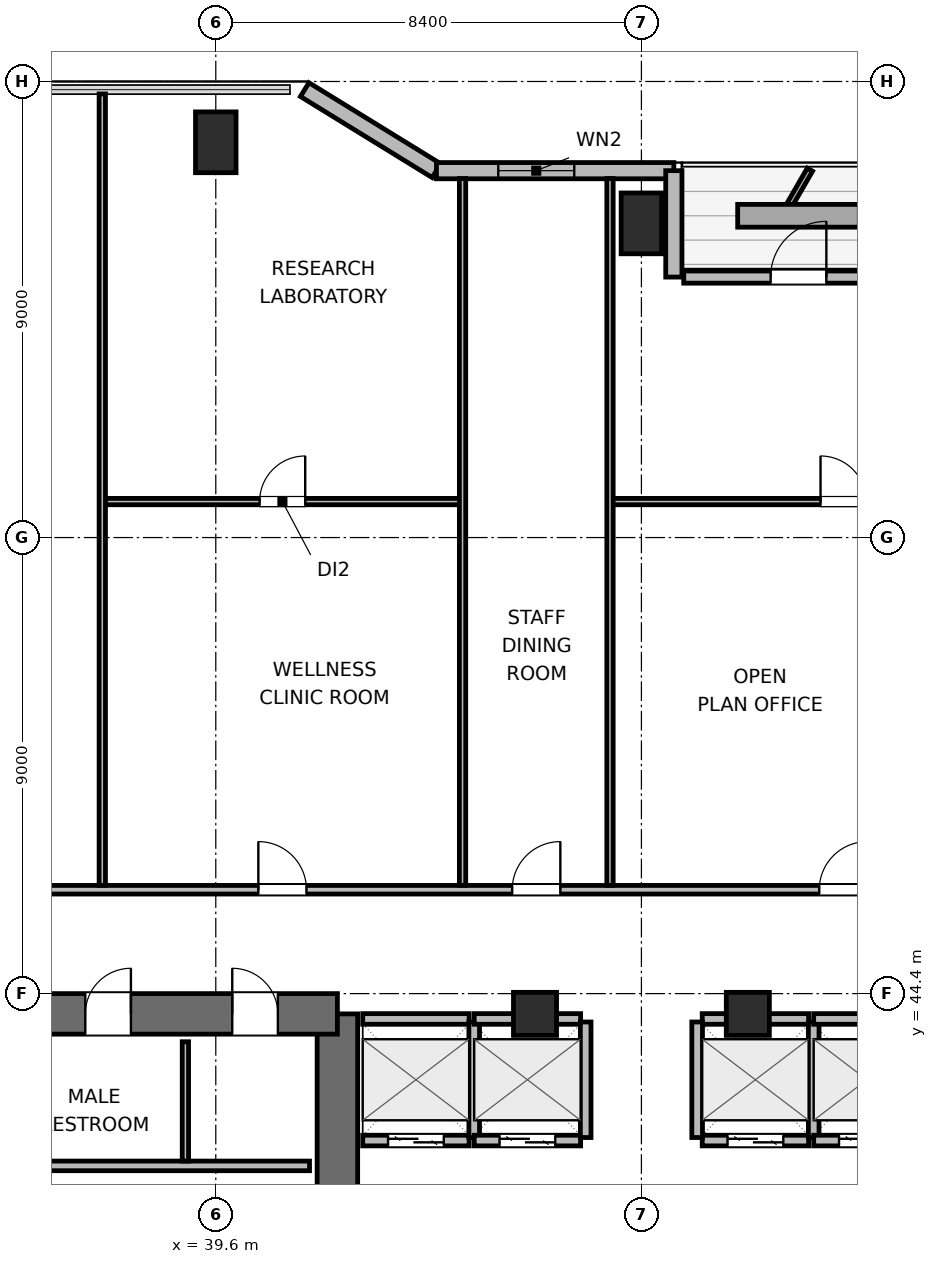
"""IFC4 building model, lengths in metres.
Left out: names, types, materials, properties, quantities, classifications, styles, units other than length and angle.
Written with IfcOpenShell. Run it as: python <this file> out.ifc"""

import sys

from ifc_helpers import new_model, si_unit, direction, frame, frame_2d, origin, origin_2d, place, context, subcontext, project, spatial, rectangle, extrude, element, fill, save


model = new_model("IFC4")
c1 = context("Model", 3, precision=1e-05, world=origin(), true_north=direction((0.0, 1.0)))
c2 = subcontext(c1, "Body", "Model", "MODEL_VIEW")
j1 = project(units=[si_unit("LENGTHUNIT", "METRE"), si_unit("PLANEANGLEUNIT", "RADIAN")], contexts=[c1])
p1 = place(None, origin())
s1 = spatial("IfcSite", under=j1, at=p1, CompositionType="ELEMENT")
p2 = place(p1, origin())
s2 = spatial("IfcBuilding", under=s1, at=p2, CompositionType="ELEMENT")
p3 = place(p2, frame((0.0, 0.0, 133.8)))
s3 = spatial("IfcBuildingStorey", under=s2, at=p3, CompositionType="ELEMENT", Elevation=133.8)
p4 = place(p3, frame((42.0, 37.8, 0.0), z_axis=(0.0, 0.0, 1.0), x_axis=(0.0, 1.0, 0.0)))
e1 = element("IfcWall", 1, at=p4, inside=s3, PredefinedType="SHEAR", context=c2, shape_type="SweptSolid", body=[
    extrude(rectangle(XDim=6.2, YDim=0.8, at=frame_2d((3.1, 0.0))), origin(), (0.0, 0.0, 1.0), 3.9),
])
p5 = place(p3, frame((32.8, 44.0, 0.0), z_axis=(0.0, 0.0, 1.0), x_axis=(1.0, 0.0, 0.0)))
e2 = element("IfcWall", 2, at=p5, inside=s3, PredefinedType="SHEAR", context=c2, shape_type="SweptSolid", body=[
    extrude(rectangle(XDim=9.2, YDim=0.8, at=frame_2d((4.6, 0.0))), origin(), (0.0, 0.0, 1.0), 3.9),
])
p6 = place(p5, frame((0.975, 0.0, 0.0)))
e3 = element("IfcOpeningElement", 3, at=p6, cuts=e2, PredefinedType="OPENING", context=c2, shape_type="SweptSolid", body=[
    extrude(rectangle(XDim=0.95, YDim=2.04, at=frame_2d((0.475, 1.02))), frame((0.0, 0.41, 0.0), z_axis=(0.0, -1.0, 0.0), x_axis=(1.0, 0.0, 0.0)), (0.0, 0.0, 1.0), 0.82),
])
p7 = place(p5, frame((4.225, 0.0, 0.0)))
e4 = element("IfcOpeningElement", 4, at=p7, cuts=e2, PredefinedType="OPENING", context=c2, shape_type="SweptSolid", body=[
    extrude(rectangle(XDim=0.9, YDim=2.02, at=frame_2d((0.45, 1.01))), frame((0.0, 0.41, 0.0), z_axis=(0.0, -1.0, 0.0), x_axis=(1.0, 0.0, 0.0)), (0.0, 0.0, 1.0), 0.82),
])
p8 = place(p5, frame((7.125, 0.0, 0.0)))
e5 = element("IfcOpeningElement", 5, at=p8, cuts=e2, PredefinedType="OPENING", context=c2, shape_type="SweptSolid", body=[
    extrude(rectangle(XDim=0.9, YDim=2.02, at=frame_2d((0.45, 1.01))), frame((0.0, 0.41, 0.0), z_axis=(0.0, -1.0, 0.0), x_axis=(1.0, 0.0, 0.0)), (0.0, 0.0, 1.0), 0.82),
])
for number, where, z_axis, x_axis in (
    (6, (39.6, 61.2, 0.0), (0.0, 0.0, 1.0), (1.0, 0.0, 0.0)),
    (7, (48.0, 59.6, 0.0), (0.0, 0.0, 1.0), (1.0, 0.0, 0.0)),
):
    element("IfcColumn", number, at=place(p3, frame(where, z_axis=z_axis, x_axis=x_axis)), inside=s3, PredefinedType="COLUMN", context=c2, shape_type="SweptSolid", body=[
        extrude(rectangle(XDim=0.8, YDim=1.2, at=origin_2d()), origin(), (0.0, 0.0, 1.0), 3.9),
    ])
for number, where, z_axis, x_axis in (
    (8, (45.9, 44.0, 0.0), (0.0, 0.0, 1.0), (1.0, 0.0, 0.0)),
    (9, (50.1, 44.0, 0.0), (0.0, 0.0, 1.0), (1.0, 0.0, 0.0)),
):
    element("IfcColumn", number, at=place(p3, frame(where, z_axis=z_axis, x_axis=x_axis)), inside=s3, PredefinedType="COLUMN", context=c2, shape_type="SweptSolid", body=[
        extrude(rectangle(XDim=0.85, YDim=0.85, at=origin_2d()), origin(), (0.0, 0.0, 1.0), 3.9),
    ])
p9 = place(p3, frame((41.355, 62.24, 0.0), z_axis=(0.0, 0.0, 1.0), x_axis=(0.851630857047, -0.524142044989, 0.0)))
e10 = element("IfcWall", 10, at=p9, inside=s3, PredefinedType="SOLIDWALL", context=c2, shape_type="SweptSolid", body=[
    extrude(rectangle(XDim=3.053, YDim=0.32, at=frame_2d((1.526, 0.0))), origin(), (0.0, 0.0, 1.0), 2.875),
])
p10 = place(p3, frame((43.955, 60.64, 0.0), z_axis=(0.0, 0.0, 1.0), x_axis=(1.0, 0.0, 0.0)))
e11 = element("IfcWall", 11, at=p10, inside=s3, PredefinedType="SOLIDWALL", context=c2, shape_type="SweptSolid", body=[
    extrude(rectangle(XDim=4.685, YDim=0.32, at=frame_2d((2.343, 0.0))), origin(), (0.0, 0.0, 1.0), 2.875),
])
p11 = place(p10, frame((1.22, 0.0, 0.85)))
e12 = element("IfcOpeningElement", 12, at=p11, cuts=e11, PredefinedType="OPENING", context=c2, shape_type="SweptSolid", body=[
    extrude(rectangle(XDim=1.5, YDim=1.1, at=frame_2d((0.75, 0.55))), frame((0.0, 0.17, 0.0), z_axis=(0.0, -1.0, 0.0), x_axis=(1.0, 0.0, 0.0)), (0.0, 0.0, 1.0), 0.34),
])
p12 = place(p3, frame((48.64, 60.64, 0.0), z_axis=(0.0, 0.0, 1.0), x_axis=(0.0, -1.0, 0.0)))
e13 = element("IfcWall", 13, at=p12, inside=s3, PredefinedType="SOLIDWALL", context=c2, shape_type="SweptSolid", body=[
    extrude(rectangle(XDim=2.1, YDim=0.32, at=frame_2d((1.05, 0.0))), origin(), (0.0, 0.0, 1.0), 2.875),
])
p13 = place(p3, frame((48.835, 58.54, 0.0), z_axis=(0.0, 0.0, 1.0), x_axis=(1.0, 0.0, 0.0)))
e14 = element("IfcWall", 14, at=p13, inside=s3, PredefinedType="SOLIDWALL", context=c2, shape_type="SweptSolid", body=[
    extrude(rectangle(XDim=4.53, YDim=0.24, at=frame_2d((2.265, 0.0))), origin(), (0.0, 0.0, 1.0), 3.64),
])
p14 = place(p13, frame((1.715, 0.0, 0.0)))
e15 = element("IfcOpeningElement", 15, at=p14, cuts=e14, PredefinedType="OPENING", context=c2, shape_type="SweptSolid", body=[
    extrude(rectangle(XDim=1.1, YDim=2.04, at=frame_2d((0.55, 1.02))), frame((0.0, 0.13, 0.0), z_axis=(0.0, -1.0, 0.0), x_axis=(1.0, 0.0, 0.0)), (0.0, 0.0, 1.0), 0.26),
])
p15 = place(p3, frame((33.35, 41.0, 0.0), z_axis=(0.0, 0.0, 1.0), x_axis=(1.0, 0.0, 0.0)))
e16 = element("IfcWall", 16, at=p15, inside=s3, PredefinedType="PLUMBINGWALL", context=c2, shape_type="SweptSolid", body=[
    extrude(rectangle(XDim=8.1, YDim=0.19, at=frame_2d((4.05, 0.0))), origin(), (0.0, 0.0, 1.0), 3.64),
])
p16 = place(p3, frame((39.0, 41.095, 0.0), z_axis=(0.0, 0.0, 1.0), x_axis=(0.0, 1.0, 0.0)))
e17 = element("IfcWall", 17, at=p16, inside=s3, PredefinedType="PARTITIONING", context=c2, shape_type="SweptSolid", body=[
    extrude(rectangle(XDim=2.355, YDim=0.125, at=frame_2d((1.177, 0.0))), origin(), (0.0, 0.0, 1.0), 3.64),
])
p17 = place(p3, frame((42.5, 41.5, 0.0), z_axis=(0.0, 0.0, 1.0), x_axis=(1.0, 0.0, 0.0)))
e18 = element("IfcWall", 18, at=p17, inside=s3, PredefinedType="PARTITIONING", context=c2, shape_type="SweptSolid", body=[
    extrude(rectangle(XDim=2.1, YDim=0.21, at=frame_2d((1.05, 0.0))), origin(), (0.0, 0.0, 1.0), 3.64),
])
p18 = place(p17, frame((0.5, 0.0, 0.0)))
e19 = element("IfcOpeningElement", 19, at=p18, cuts=e18, PredefinedType="OPENING", context=c2, shape_type="SweptSolid", body=[
    extrude(rectangle(XDim=1.1, YDim=2.04, at=frame_2d((0.55, 1.02))), frame((0.0, 0.115, 0.0), z_axis=(0.0, -1.0, 0.0), x_axis=(1.0, 0.0, 0.0)), (0.0, 0.0, 1.0), 0.23),
])
p19 = place(p3, frame((42.5, 43.9, 0.0), z_axis=(0.0, 0.0, 1.0), x_axis=(1.0, 0.0, 0.0)))
e20 = element("IfcWall", 20, at=p19, inside=s3, PredefinedType="PARTITIONING", context=c2, shape_type="SweptSolid", body=[
    extrude(rectangle(XDim=2.1, YDim=0.21, at=frame_2d((1.05, 0.0))), origin(), (0.0, 0.0, 1.0), 2.525),
])
p20 = place(p3, frame((44.7, 41.56, 0.0), z_axis=(0.0, 0.0, 1.0), x_axis=(0.0, 1.0, 0.0)))
e21 = element("IfcWall", 21, at=p20, inside=s3, PredefinedType="PARTITIONING", context=c2, shape_type="SweptSolid", body=[
    extrude(rectangle(XDim=2.28, YDim=0.21, at=frame_2d((1.14, 0.0))), origin(), (0.0, 0.0, 1.0), 3.64),
])
p21 = place(p3, frame((44.7, 41.5, 0.0), z_axis=(0.0, 0.0, 1.0), x_axis=(1.0, 0.0, 0.0)))
e22 = element("IfcWall", 22, at=p21, inside=s3, PredefinedType="PARTITIONING", context=c2, shape_type="SweptSolid", body=[
    extrude(rectangle(XDim=2.1, YDim=0.21, at=frame_2d((1.05, 0.0))), origin(), (0.0, 0.0, 1.0), 3.64),
])
p22 = place(p21, frame((0.5, 0.0, 0.0)))
e23 = element("IfcOpeningElement", 23, at=p22, cuts=e22, PredefinedType="OPENING", context=c2, shape_type="SweptSolid", body=[
    extrude(rectangle(XDim=1.1, YDim=2.04, at=frame_2d((0.55, 1.02))), frame((0.0, 0.115, 0.0), z_axis=(0.0, -1.0, 0.0), x_axis=(1.0, 0.0, 0.0)), (0.0, 0.0, 1.0), 0.23),
])
p23 = place(p3, frame((44.7, 43.9, 0.0), z_axis=(0.0, 0.0, 1.0), x_axis=(1.0, 0.0, 0.0)))
e24 = element("IfcWall", 24, at=p23, inside=s3, PredefinedType="PARTITIONING", context=c2, shape_type="SweptSolid", body=[
    extrude(rectangle(XDim=2.1, YDim=0.21, at=frame_2d((1.05, 0.0))), origin(), (0.0, 0.0, 1.0), 2.525),
])
p24 = place(p3, frame((46.9, 41.56, 0.0), z_axis=(0.0, 0.0, 1.0), x_axis=(0.0, 1.0, 0.0)))
e25 = element("IfcWall", 25, at=p24, inside=s3, PredefinedType="PARTITIONING", context=c2, shape_type="SweptSolid", body=[
    extrude(rectangle(XDim=2.28, YDim=0.21, at=frame_2d((1.14, 0.0))), origin(), (0.0, 0.0, 1.0), 3.64),
])
p25 = place(p3, frame((49.2, 41.5, 0.0), z_axis=(0.0, 0.0, 1.0), x_axis=(1.0, 0.0, 0.0)))
e26 = element("IfcWall", 26, at=p25, inside=s3, PredefinedType="PARTITIONING", context=c2, shape_type="SweptSolid", body=[
    extrude(rectangle(XDim=2.1, YDim=0.21, at=frame_2d((1.05, 0.0))), origin(), (0.0, 0.0, 1.0), 3.64),
])
p26 = place(p25, frame((0.5, 0.0, 0.0)))
e27 = element("IfcOpeningElement", 27, at=p26, cuts=e26, PredefinedType="OPENING", context=c2, shape_type="SweptSolid", body=[
    extrude(rectangle(XDim=1.1, YDim=2.04, at=frame_2d((0.55, 1.02))), frame((0.0, 0.115, 0.0), z_axis=(0.0, -1.0, 0.0), x_axis=(1.0, 0.0, 0.0)), (0.0, 0.0, 1.0), 0.23),
])
p27 = place(p3, frame((49.2, 43.9, 0.0), z_axis=(0.0, 0.0, 1.0), x_axis=(1.0, 0.0, 0.0)))
e28 = element("IfcWall", 28, at=p27, inside=s3, PredefinedType="PARTITIONING", context=c2, shape_type="SweptSolid", body=[
    extrude(rectangle(XDim=2.1, YDim=0.21, at=frame_2d((1.05, 0.0))), origin(), (0.0, 0.0, 1.0), 2.525),
])
for number, where, z_axis, x_axis in (
    (29, (49.1, 41.56, 0.0), (0.0, 0.0, 1.0), (0.0, 1.0, 0.0)),
    (30, (51.4, 41.56, 0.0), (0.0, 0.0, 1.0), (0.0, 1.0, 0.0)),
):
    element("IfcWall", number, at=place(p3, frame(where, z_axis=z_axis, x_axis=x_axis)), inside=s3, PredefinedType="PARTITIONING", context=c2, shape_type="SweptSolid", body=[
        extrude(rectangle(XDim=2.28, YDim=0.21, at=frame_2d((1.14, 0.0))), origin(), (0.0, 0.0, 1.0), 3.64),
    ])
p28 = place(p3, frame((51.4, 41.5, 0.0), z_axis=(0.0, 0.0, 1.0), x_axis=(1.0, 0.0, 0.0)))
e31 = element("IfcWall", 31, at=p28, inside=s3, PredefinedType="PARTITIONING", context=c2, shape_type="SweptSolid", body=[
    extrude(rectangle(XDim=2.1, YDim=0.21, at=frame_2d((1.05, 0.0))), origin(), (0.0, 0.0, 1.0), 3.64),
])
p29 = place(p28, frame((0.5, 0.0, 0.0)))
e32 = element("IfcOpeningElement", 32, at=p29, cuts=e31, PredefinedType="OPENING", context=c2, shape_type="SweptSolid", body=[
    extrude(rectangle(XDim=1.1, YDim=2.04, at=frame_2d((0.55, 1.02))), frame((0.0, 0.115, 0.0), z_axis=(0.0, -1.0, 0.0), x_axis=(1.0, 0.0, 0.0)), (0.0, 0.0, 1.0), 0.23),
])
p30 = place(p3, frame((51.4, 43.9, 0.0), z_axis=(0.0, 0.0, 1.0), x_axis=(1.0, 0.0, 0.0)))
e33 = element("IfcWall", 33, at=p30, inside=s3, PredefinedType="PARTITIONING", context=c2, shape_type="SweptSolid", body=[
    extrude(rectangle(XDim=2.1, YDim=0.21, at=frame_2d((1.05, 0.0))), origin(), (0.0, 0.0, 1.0), 2.525),
])
p31 = place(p3, frame((30.35, 46.45, 0.0), z_axis=(0.0, 0.0, 1.0), x_axis=(1.0, 0.0, 0.0)))
e34 = element("IfcWall", 34, at=p31, inside=s3, PredefinedType="PARTITIONING", context=c2, shape_type="SweptSolid", body=[
    extrude(rectangle(XDim=33.25, YDim=0.17, at=frame_2d((16.625, 0.0))), origin(), (0.0, 0.0, 1.0), 3.64),
])
p32 = place(p31, frame((3.03, 0.0, 0.0)))
e35 = element("IfcOpeningElement", 35, at=p32, cuts=e34, PredefinedType="OPENING", context=c2, shape_type="SweptSolid", body=[
    extrude(rectangle(XDim=0.95, YDim=2.04, at=frame_2d((0.475, 1.02))), frame((0.0, 0.095, 0.0), z_axis=(0.0, -1.0, 0.0), x_axis=(1.0, 0.0, 0.0)), (0.0, 0.0, 1.0), 0.19),
])
p33 = place(p31, frame((10.09, 0.0, 0.0)))
e36 = element("IfcOpeningElement", 36, at=p33, cuts=e34, PredefinedType="OPENING", context=c2, shape_type="SweptSolid", body=[
    extrude(rectangle(XDim=0.95, YDim=2.04, at=frame_2d((0.475, 1.02))), frame((0.0, 0.095, 0.0), z_axis=(0.0, -1.0, 0.0), x_axis=(1.0, 0.0, 0.0)), (0.0, 0.0, 1.0), 0.19),
])
p34 = place(p31, frame((15.1, 0.0, 0.0)))
e37 = element("IfcOpeningElement", 37, at=p34, cuts=e34, PredefinedType="OPENING", context=c2, shape_type="SweptSolid", body=[
    extrude(rectangle(XDim=0.95, YDim=2.04, at=frame_2d((0.475, 1.02))), frame((0.0, 0.095, 0.0), z_axis=(0.0, -1.0, 0.0), x_axis=(1.0, 0.0, 0.0)), (0.0, 0.0, 1.0), 0.19),
])
p35 = place(p31, frame((21.16, 0.0, 0.0)))
e38 = element("IfcOpeningElement", 38, at=p35, cuts=e34, PredefinedType="OPENING", context=c2, shape_type="SweptSolid", body=[
    extrude(rectangle(XDim=0.95, YDim=2.04, at=frame_2d((0.475, 1.02))), frame((0.0, 0.095, 0.0), z_axis=(0.0, -1.0, 0.0), x_axis=(1.0, 0.0, 0.0)), (0.0, 0.0, 1.0), 0.19),
])
p36 = place(p31, frame((29.27, 0.0, 0.0)))
e39 = element("IfcOpeningElement", 39, at=p36, cuts=e34, PredefinedType="OPENING", context=c2, shape_type="SweptSolid", body=[
    extrude(rectangle(XDim=0.95, YDim=2.04, at=frame_2d((0.475, 1.02))), frame((0.0, 0.095, 0.0), z_axis=(0.0, -1.0, 0.0), x_axis=(1.0, 0.0, 0.0)), (0.0, 0.0, 1.0), 0.19),
])
p37 = place(p3, frame((37.36, 54.11, 0.0), z_axis=(0.0, 0.0, 1.0), x_axis=(1.0, 0.0, 0.0)))
e40 = element("IfcWall", 40, at=p37, inside=s3, PredefinedType="PARTITIONING", context=c2, shape_type="SweptSolid", body=[
    extrude(rectangle(XDim=7.11, YDim=0.125, at=frame_2d((3.555, 0.0))), origin(), (0.0, 0.0, 1.0), 3.64),
])
p38 = place(p37, frame((3.105, 0.0, 0.0)))
e41 = element("IfcOpeningElement", 41, at=p38, cuts=e40, PredefinedType="OPENING", context=c2, shape_type="SweptSolid", body=[
    extrude(rectangle(XDim=0.9, YDim=2.02, at=frame_2d((0.45, 1.01))), frame((0.0, 0.073, 0.0), z_axis=(0.0, -1.0, 0.0), x_axis=(1.0, 0.0, 0.0)), (0.0, 0.0, 1.0), 0.145),
])
p39 = place(p3, frame((37.36, 46.537, 0.0), z_axis=(0.0, 0.0, 1.0), x_axis=(0.0, 1.0, 0.0)))
e42 = element("IfcWall", 42, at=p39, inside=s3, PredefinedType="PARTITIONING", context=c2, shape_type="SweptSolid", body=[
    extrude(rectangle(XDim=15.618, YDim=0.125, at=frame_2d((7.809, 0.0))), origin(), (0.0, 0.0, 1.0), 3.64),
])
p40 = place(p3, frame((44.47, 46.537, 0.0), z_axis=(0.0, 0.0, 1.0), x_axis=(0.0, 1.0, 0.0)))
e43 = element("IfcWall", 43, at=p40, inside=s3, PredefinedType="PARTITIONING", context=c2, shape_type="SweptSolid", body=[
    extrude(rectangle(XDim=13.948, YDim=0.125, at=frame_2d((6.974, 0.0))), origin(), (0.0, 0.0, 1.0), 3.003),
])
p41 = place(p3, frame((47.38, 54.11, 0.0), z_axis=(0.0, 0.0, 1.0), x_axis=(1.0, 0.0, 0.0)))
e44 = element("IfcWall", 44, at=p41, inside=s3, PredefinedType="PARTITIONING", context=c2, shape_type="SweptSolid", body=[
    extrude(rectangle(XDim=9.21, YDim=0.125, at=frame_2d((4.605, 0.0))), origin(), (0.0, 0.0, 1.0), 3.64),
])
p42 = place(p41, frame((4.155, 0.0, 0.0)))
e45 = element("IfcOpeningElement", 45, at=p42, cuts=e44, PredefinedType="OPENING", context=c2, shape_type="SweptSolid", body=[
    extrude(rectangle(XDim=0.9, YDim=2.02, at=frame_2d((0.45, 1.01))), frame((0.0, 0.073, 0.0), z_axis=(0.0, -1.0, 0.0), x_axis=(1.0, 0.0, 0.0)), (0.0, 0.0, 1.0), 0.145),
])
p43 = place(p3, frame((47.38, 46.537, 0.0), z_axis=(0.0, 0.0, 1.0), x_axis=(0.0, 1.0, 0.0)))
e46 = element("IfcWall", 46, at=p43, inside=s3, PredefinedType="PARTITIONING", context=c2, shape_type="SweptSolid", body=[
    extrude(rectangle(XDim=13.948, YDim=0.125, at=frame_2d((6.974, 0.0))), origin(), (0.0, 0.0, 1.0), 3.64),
])
p44 = place(p11, origin())
e47 = element("IfcWindow", 47, at=p44, inside=s3, PartitioningType="SINGLE_PANEL", PredefinedType="WINDOW", context=c2, shape_type="SweptSolid", body=[
    extrude(rectangle(XDim=1.5, YDim=1.1, at=frame_2d((0.75, 0.55))), frame((0.0, 0.03, 0.0), z_axis=(0.0, -1.0, 0.0), x_axis=(1.0, 0.0, 0.0)), (0.0, 0.0, 1.0), 0.06),
])
fill(e12, e47)
p45 = place(p14, origin())
e48 = element("IfcDoor", 48, at=p45, inside=s3, OperationType="SINGLE_SWING_RIGHT", PredefinedType="DOOR", context=c2, shape_type="SweptSolid", body=[
    extrude(rectangle(XDim=1.1, YDim=2.04, at=frame_2d((0.55, 1.02))), frame((0.0, 0.025, 0.0), z_axis=(0.0, -1.0, 0.0), x_axis=(1.0, 0.0, 0.0)), (0.0, 0.0, 1.0), 0.05),
])
fill(e15, e48)
p46 = place(p18, origin())
e49 = element("IfcDoor", 49, at=p46, inside=s3, OperationType="DOUBLE_DOOR_SLIDING", PredefinedType="DOOR", context=c2, shape_type="SweptSolid", body=[
    extrude(rectangle(XDim=1.1, YDim=2.04, at=frame_2d((0.55, 1.02))), frame((0.0, 0.025, 0.0), z_axis=(0.0, -1.0, 0.0), x_axis=(1.0, 0.0, 0.0)), (0.0, 0.0, 1.0), 0.05),
])
fill(e19, e49)
p47 = place(p22, origin())
e50 = element("IfcDoor", 50, at=p47, inside=s3, OperationType="DOUBLE_DOOR_SLIDING", PredefinedType="DOOR", context=c2, shape_type="SweptSolid", body=[
    extrude(rectangle(XDim=1.1, YDim=2.04, at=frame_2d((0.55, 1.02))), frame((0.0, 0.025, 0.0), z_axis=(0.0, -1.0, 0.0), x_axis=(1.0, 0.0, 0.0)), (0.0, 0.0, 1.0), 0.05),
])
fill(e23, e50)
p48 = place(p26, origin())
e51 = element("IfcDoor", 51, at=p48, inside=s3, OperationType="DOUBLE_DOOR_SLIDING", PredefinedType="DOOR", context=c2, shape_type="SweptSolid", body=[
    extrude(rectangle(XDim=1.1, YDim=2.04, at=frame_2d((0.55, 1.02))), frame((0.0, 0.025, 0.0), z_axis=(0.0, -1.0, 0.0), x_axis=(1.0, 0.0, 0.0)), (0.0, 0.0, 1.0), 0.05),
])
fill(e27, e51)
p49 = place(p29, origin())
e52 = element("IfcDoor", 52, at=p49, inside=s3, OperationType="DOUBLE_DOOR_SLIDING", PredefinedType="DOOR", context=c2, shape_type="SweptSolid", body=[
    extrude(rectangle(XDim=1.1, YDim=2.04, at=frame_2d((0.55, 1.02))), frame((0.0, 0.025, 0.0), z_axis=(0.0, -1.0, 0.0), x_axis=(1.0, 0.0, 0.0)), (0.0, 0.0, 1.0), 0.05),
])
fill(e32, e52)
p50 = place(p7, origin())
e53 = element("IfcDoor", 53, at=p50, inside=s3, OperationType="SINGLE_SWING_RIGHT", PredefinedType="DOOR", context=c2, shape_type="SweptSolid", body=[
    extrude(rectangle(XDim=0.9, YDim=2.02, at=frame_2d((0.45, 1.01))), frame((0.0, 0.025, 0.0), z_axis=(0.0, -1.0, 0.0), x_axis=(1.0, 0.0, 0.0)), (0.0, 0.0, 1.0), 0.05),
])
fill(e4, e53)
p51 = place(p8, origin())
e54 = element("IfcDoor", 54, at=p51, inside=s3, OperationType="SINGLE_SWING_LEFT", PredefinedType="DOOR", context=c2, shape_type="SweptSolid", body=[
    extrude(rectangle(XDim=0.9, YDim=2.02, at=frame_2d((0.45, 1.01))), frame((0.0, 0.025, 0.0), z_axis=(0.0, -1.0, 0.0), x_axis=(1.0, 0.0, 0.0)), (0.0, 0.0, 1.0), 0.05),
])
fill(e5, e54)
p52 = place(p38, origin())
e55 = element("IfcDoor", 55, at=p52, inside=s3, OperationType="SINGLE_SWING_RIGHT", PredefinedType="DOOR", context=c2, shape_type="SweptSolid", body=[
    extrude(rectangle(XDim=0.9, YDim=2.02, at=frame_2d((0.45, 1.01))), frame((0.0, 0.025, 0.0), z_axis=(0.0, -1.0, 0.0), x_axis=(1.0, 0.0, 0.0)), (0.0, 0.0, 1.0), 0.05),
])
fill(e41, e55)
p53 = place(p33, origin())
e56 = element("IfcDoor", 56, at=p53, inside=s3, OperationType="SINGLE_SWING_LEFT", PredefinedType="DOOR", context=c2, shape_type="SweptSolid", body=[
    extrude(rectangle(XDim=0.95, YDim=2.04, at=frame_2d((0.475, 1.02))), frame((0.0, 0.025, 0.0), z_axis=(0.0, -1.0, 0.0), x_axis=(1.0, 0.0, 0.0)), (0.0, 0.0, 1.0), 0.05),
])
fill(e36, e56)
p54 = place(p34, origin())
e57 = element("IfcDoor", 57, at=p54, inside=s3, OperationType="SINGLE_SWING_RIGHT", PredefinedType="DOOR", context=c2, shape_type="SweptSolid", body=[
    extrude(rectangle(XDim=0.95, YDim=2.04, at=frame_2d((0.475, 1.02))), frame((0.0, 0.025, 0.0), z_axis=(0.0, -1.0, 0.0), x_axis=(1.0, 0.0, 0.0)), (0.0, 0.0, 1.0), 0.05),
])
fill(e37, e57)
p55 = place(p42, origin())
e58 = element("IfcDoor", 58, at=p55, inside=s3, OperationType="SINGLE_SWING_LEFT", PredefinedType="DOOR", context=c2, shape_type="SweptSolid", body=[
    extrude(rectangle(XDim=0.9, YDim=2.02, at=frame_2d((0.45, 1.01))), frame((0.0, 0.025, 0.0), z_axis=(0.0, -1.0, 0.0), x_axis=(1.0, 0.0, 0.0)), (0.0, 0.0, 1.0), 0.05),
])
fill(e45, e58)
p56 = place(p35, origin())
e59 = element("IfcDoor", 59, at=p56, inside=s3, OperationType="SINGLE_SWING_RIGHT", PredefinedType="DOOR", context=c2, shape_type="SweptSolid", body=[
    extrude(rectangle(XDim=0.95, YDim=2.04, at=frame_2d((0.475, 1.02))), frame((0.0, 0.025, 0.0), z_axis=(0.0, -1.0, 0.0), x_axis=(1.0, 0.0, 0.0)), (0.0, 0.0, 1.0), 0.05),
])
fill(e38, e59)
save(model, sys.argv[1])
